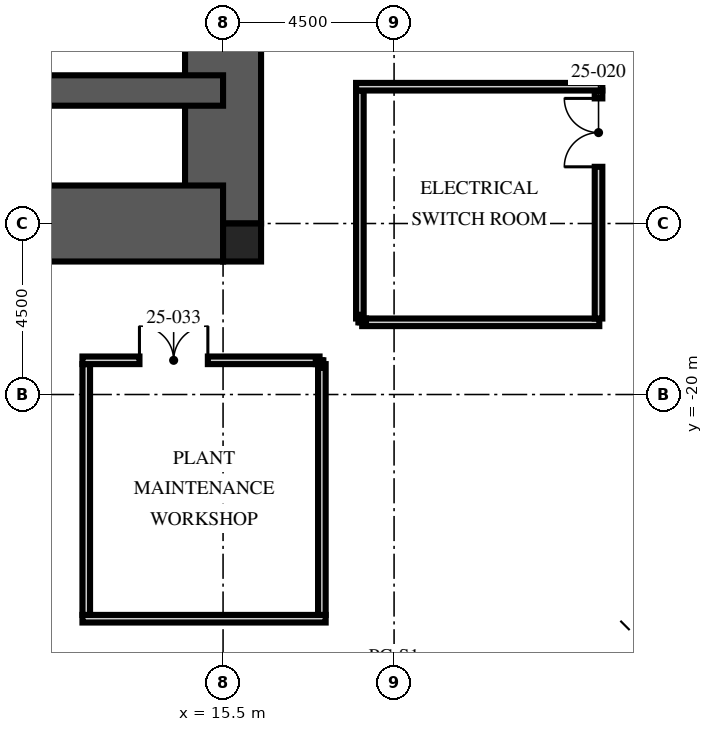
"""IFC4 building model, lengths in metres.
Left out: names, types, materials, properties, quantities, classifications, styles, units other than length and angle.
Written with IfcOpenShell. Run it as: python <this file> out.ifc"""

import sys

from ifc_helpers import new_model, si_unit, direction, frame, frame_2d, origin, origin_2d, place, context, subcontext, project, spatial, rectangle, hollow_rectangle, extrude, element, fill, save


model = new_model("IFC4")
c1 = context("Model", 3, precision=1e-05, world=origin(), true_north=direction((0.0, 1.0)))
c2 = subcontext(c1, "Body", "Model", "MODEL_VIEW")
j1 = project(units=[si_unit("LENGTHUNIT", "METRE"), si_unit("PLANEANGLEUNIT", "RADIAN")], contexts=[c1])
p1 = place(None, origin())
s1 = spatial("IfcSite", under=j1, at=p1, CompositionType="ELEMENT")
p2 = place(p1, origin())
s2 = spatial("IfcBuilding", under=s1, at=p2, CompositionType="ELEMENT")
p3 = place(p2, frame((0.0, 0.0, 99.75)))
s3 = spatial("IfcBuildingStorey", under=s2, at=p3, CompositionType="ELEMENT", Elevation=99.75)
p4 = place(p3, frame((15.5, -15.5, -0.35), z_axis=(0.0, 0.0, 1.0), x_axis=(0.0, 1.0, 0.0)))
e1 = element("IfcWall", 1, at=p4, inside=s3, PredefinedType="SHEAR", context=c2, shape_type="SweptSolid", body=[
    extrude(rectangle(XDim=31.0, YDim=2.0, at=frame_2d((15.5, 0.0))), origin(), (0.0, 0.0, 1.0), 7.6),
])
p5 = place(p4, frame((6.5, 0.0, 0.35)))
e2 = element("IfcOpeningElement", 2, at=p5, cuts=e1, PredefinedType="OPENING", context=c2, shape_type="SweptSolid", body=[
    extrude(rectangle(XDim=1.2, YDim=2.1, at=frame_2d((0.6, 1.05))), frame((0.0, 1.01, 0.0), z_axis=(0.0, -1.0, 0.0), x_axis=(1.0, 0.0, 0.0)), (0.0, 0.0, 1.0), 2.02),
])
p6 = place(p4, frame((22.7, 0.0, 0.35)))
e3 = element("IfcOpeningElement", 3, at=p6, cuts=e1, PredefinedType="OPENING", context=c2, shape_type="SweptSolid", body=[
    extrude(rectangle(XDim=1.8, YDim=2.1, at=frame_2d((0.9, 1.05))), frame((0.0, 1.01, 0.0), z_axis=(0.0, -1.0, 0.0), x_axis=(1.0, 0.0, 0.0)), (0.0, 0.0, 1.0), 2.02),
])
p7 = place(p3, frame((-15.5, -15.5, -0.35), z_axis=(0.0, 0.0, 1.0), x_axis=(1.0, 0.0, 0.0)))
e4 = element("IfcWall", 4, at=p7, inside=s3, PredefinedType="SHEAR", context=c2, shape_type="SweptSolid", body=[
    extrude(rectangle(XDim=31.0, YDim=2.0, at=frame_2d((15.5, 0.0))), origin(), (0.0, 0.0, 1.0), 7.6),
])
p8 = place(p3, frame((-15.5, -12.0, -0.35), z_axis=(0.0, 0.0, 1.0), x_axis=(1.0, 0.0, 0.0)))
e5 = element("IfcWall", 5, at=p8, inside=s3, PredefinedType="SHEAR", context=c2, shape_type="SweptSolid", body=[
    extrude(rectangle(XDim=31.0, YDim=0.8, at=frame_2d((15.5, 0.0))), origin(), (0.0, 0.0, 1.0), 7.6),
])
p9 = place(p3, frame((16.0, -16.0, -0.35), z_axis=(0.0, 0.0, 1.0), x_axis=(1.0, 0.0, 0.0)))
e6 = element("IfcColumn", 6, at=p9, inside=s3, PredefinedType="COLUMN", context=c2, shape_type="SweptSolid", body=[
    extrude(rectangle(XDim=1.0, YDim=1.0, at=origin_2d()), origin(), (0.0, 0.0, 1.0), 7.6),
])
p10 = place(p3, frame((29.8, -10.0, -0.65), z_axis=(-0.332963994967, 0.103601510687, 0.937230870724), x_axis=(0.034712905596, 0.994618884766, -0.097612951251)))
e7 = element("IfcColumn", 7, at=p10, inside=s3, PredefinedType="COLUMN", context=c2, shape_type="SweptSolid", body=[
    extrude(hollow_rectangle(XDim=3.2, YDim=1.8, WallThickness=0.2, at=origin_2d()), origin(), (0.0, 0.0, 1.0), 8.109),
])
for number, where, z_axis, x_axis in (
    (8, (29.8, -20.0, -0.65), (-0.328, 0.204, 0.923), (0.068, 0.979, -0.192)),
    (9, (20.0, -29.8, -0.65), (-0.204, 0.328, 0.923), (0.979, 0.068, 0.192)),
):
    element("IfcColumn", number, at=place(p3, frame(where, z_axis=z_axis, x_axis=x_axis)), inside=s3, PredefinedType="COLUMN", context=c2, shape_type="SweptSolid", body=[
        extrude(hollow_rectangle(XDim=3.2, YDim=1.8, WallThickness=0.2, at=origin_2d()), origin(), (0.0, 0.0, 1.0), 8.238),
    ])
p11 = place(p3, frame((10.0, -29.8, -0.65), z_axis=(-0.103601510687, 0.332963994967, 0.937230870724), x_axis=(0.994618884766, 0.034712905596, 0.097612951251)))
e10 = element("IfcColumn", 10, at=p11, inside=s3, PredefinedType="COLUMN", context=c2, shape_type="SweptSolid", body=[
    extrude(hollow_rectangle(XDim=3.2, YDim=1.8, WallThickness=0.2, at=origin_2d()), origin(), (0.0, 0.0, 1.0), 8.109),
])
p12 = place(p3, frame((28.394, -28.394, -0.65), z_axis=(-0.300622896132, 0.300622896132, 0.905125266824), x_axis=(0.707106781187, 0.707106781187, 0.0)))
e11 = element("IfcColumn", 11, at=p12, inside=s3, PredefinedType="COLUMN", context=c2, shape_type="SweptSolid", body=[
    extrude(hollow_rectangle(XDim=1.6, YDim=1.6, WallThickness=0.1, at=origin_2d()), origin(), (0.0, 0.0, 1.0), 8.396),
])
p13 = place(p3, frame((11.8, -25.9, 0.0), z_axis=(0.0, 0.0, 1.0), x_axis=(1.0, 0.0, 0.0)))
e12 = element("IfcWall", 12, at=p13, inside=s3, PredefinedType="SOLIDWALL", context=c2, shape_type="SweptSolid", body=[
    extrude(rectangle(XDim=6.4, YDim=0.2, at=frame_2d((3.2, 0.0))), origin(), (0.0, 0.0, 1.0), 6.45),
])
p14 = place(p3, frame((11.9, -25.8, 0.0), z_axis=(0.0, 0.0, 1.0), x_axis=(0.0, 1.0, 0.0)))
e13 = element("IfcWall", 13, at=p14, inside=s3, PredefinedType="SOLIDWALL", context=c2, shape_type="SweptSolid", body=[
    extrude(rectangle(XDim=6.6, YDim=0.2, at=frame_2d((3.3, 0.0))), origin(), (0.0, 0.0, 1.0), 7.25),
])
p15 = place(p3, frame((18.1, -25.8, 0.0), z_axis=(0.0, 0.0, 1.0), x_axis=(0.0, 1.0, 0.0)))
e14 = element("IfcWall", 14, at=p15, inside=s3, PredefinedType="SOLIDWALL", context=c2, shape_type="SweptSolid", body=[
    extrude(rectangle(XDim=6.6, YDim=0.2, at=frame_2d((3.3, 0.0))), origin(), (0.0, 0.0, 1.0), 6.45),
])
p16 = place(p3, frame((18.039, -19.2, 0.0), z_axis=(0.0, 0.0, 1.0), x_axis=(1.0, 0.0, 0.0)))
e15 = element("IfcWall", 15, at=p16, inside=s3, PredefinedType="SOLIDWALL", context=c2, shape_type="SweptSolid", body=[
    extrude(rectangle(XDim=0.061, YDim=0.2, at=frame_2d((0.03, 0.0))), origin(), (0.0, 0.0, 1.0), 7.25),
])
p17 = place(p3, frame((11.8, -19.1, 0.0), z_axis=(0.0, 0.0, 1.0), x_axis=(1.0, 0.0, 0.0)))
e16 = element("IfcWall", 16, at=p17, inside=s3, PredefinedType="SOLIDWALL", context=c2, shape_type="SweptSolid", body=[
    extrude(rectangle(XDim=6.239, YDim=0.2, at=frame_2d((3.12, 0.0))), origin(), (0.0, 0.0, 1.0), 6.46),
])
p18 = place(p17, frame((1.5, 0.0, 0.0)))
e17 = element("IfcOpeningElement", 17, at=p18, cuts=e16, PredefinedType="OPENING", context=c2, shape_type="SweptSolid", body=[
    extrude(rectangle(XDim=1.8, YDim=2.4, at=frame_2d((0.9, 1.2))), frame((0.0, 0.11, 0.0), z_axis=(0.0, -1.0, 0.0), x_axis=(1.0, 0.0, 0.0)), (0.0, 0.0, 1.0), 0.22),
])
p19 = place(p3, frame((18.039, -19.1, 0.0), z_axis=(0.0, 0.0, 1.0), x_axis=(0.0, -1.0, 0.0)))
e18 = element("IfcWall", 18, at=p19, inside=s3, PredefinedType="SOLIDWALL", context=c2, shape_type="SweptSolid", body=[
    extrude(rectangle(XDim=0.1, YDim=0.2, at=frame_2d((0.05, 0.0))), origin(), (0.0, 0.0, 1.0), 7.25),
])
p20 = place(p3, frame((19.161, -18.1, 0.0), z_axis=(0.0, 0.0, 1.0), x_axis=(1.0, 0.0, 0.0)))
e19 = element("IfcWall", 19, at=p20, inside=s3, PredefinedType="SOLIDWALL", context=c2, shape_type="SweptSolid", body=[
    extrude(rectangle(XDim=6.239, YDim=0.2, at=frame_2d((3.12, 0.0))), origin(), (0.0, 0.0, 1.0), 6.45),
])
p21 = place(p3, frame((19.161, -18.1, 0.0), z_axis=(0.0, 0.0, 1.0), x_axis=(0.0, 1.0, 0.0)))
e20 = element("IfcWall", 20, at=p21, inside=s3, PredefinedType="SOLIDWALL", context=c2, shape_type="SweptSolid", body=[
    extrude(rectangle(XDim=0.1, YDim=0.2, at=frame_2d((0.05, 0.0))), origin(), (0.0, 0.0, 1.0), 7.25),
])
p22 = place(p3, frame((19.1, -18.0, 0.0), z_axis=(0.0, 0.0, 1.0), x_axis=(0.0, 1.0, 0.0)))
e21 = element("IfcWall", 21, at=p22, inside=s3, PredefinedType="SOLIDWALL", context=c2, shape_type="SweptSolid", body=[
    extrude(rectangle(XDim=6.0, YDim=0.2, at=frame_2d((3.0, 0.0))), origin(), (0.0, 0.0, 1.0), 6.46),
])
p23 = place(p3, frame((19.161, -18.0, 0.0), z_axis=(0.0, 0.0, 1.0), x_axis=(-1.0, 0.0, 0.0)))
e22 = element("IfcWall", 22, at=p23, inside=s3, PredefinedType="SOLIDWALL", context=c2, shape_type="SweptSolid", body=[
    extrude(rectangle(XDim=0.061, YDim=0.2, at=frame_2d((0.03, 0.0))), origin(), (0.0, 0.0, 1.0), 7.25),
])
p24 = place(p3, frame((25.38, -18.0, 0.0), z_axis=(0.0, 0.0, 1.0), x_axis=(0.0, 1.0, 0.0)))
e23 = element("IfcWall", 23, at=p24, inside=s3, PredefinedType="SOLIDWALL", context=c2, shape_type="SweptSolid", body=[
    extrude(rectangle(XDim=6.0, YDim=0.2, at=frame_2d((3.0, 0.0))), origin(), (0.0, 0.0, 1.0), 6.46),
])
p25 = place(p24, frame((3.992, 0.0, 0.0)))
e24 = element("IfcOpeningElement", 24, at=p25, cuts=e23, PredefinedType="OPENING", context=c2, shape_type="SweptSolid", body=[
    extrude(rectangle(XDim=1.8, YDim=2.4, at=frame_2d((0.9, 1.2))), frame((0.0, 0.11, 0.0), z_axis=(0.0, -1.0, 0.0), x_axis=(1.0, 0.0, 0.0)), (0.0, 0.0, 1.0), 0.22),
])
p26 = place(p3, frame((19.0, -11.9, 0.0), z_axis=(0.0, 0.0, 1.0), x_axis=(1.0, 0.0, 0.0)))
e25 = element("IfcWall", 25, at=p26, inside=s3, PredefinedType="SOLIDWALL", context=c2, shape_type="SweptSolid", body=[
    extrude(rectangle(XDim=6.48, YDim=0.2, at=frame_2d((3.24, 0.0))), origin(), (0.0, 0.0, 1.0), 7.25),
])
p27 = place(p25, origin())
e26 = element("IfcDoor", 26, at=p27, inside=s3, OperationType="DOUBLE_DOOR_SINGLE_SWING", PredefinedType="DOOR", context=c2, shape_type="SweptSolid", body=[
    extrude(rectangle(XDim=1.8, YDim=2.4, at=frame_2d((0.9, 1.2))), frame((0.0, 0.025, 0.0), z_axis=(0.0, -1.0, 0.0), x_axis=(1.0, 0.0, 0.0)), (0.0, 0.0, 1.0), 0.05),
])
fill(e24, e26)
p28 = place(p18, origin())
e27 = element("IfcDoor", 27, at=p28, inside=s3, OperationType="DOUBLE_DOOR_SINGLE_SWING", PredefinedType="DOOR", context=c2, shape_type="SweptSolid", body=[
    extrude(rectangle(XDim=1.8, YDim=2.4, at=frame_2d((0.9, 1.2))), frame((0.0, 0.025, 0.0), z_axis=(0.0, -1.0, 0.0), x_axis=(1.0, 0.0, 0.0)), (0.0, 0.0, 1.0), 0.05),
])
fill(e17, e27)
save(model, sys.argv[1])
